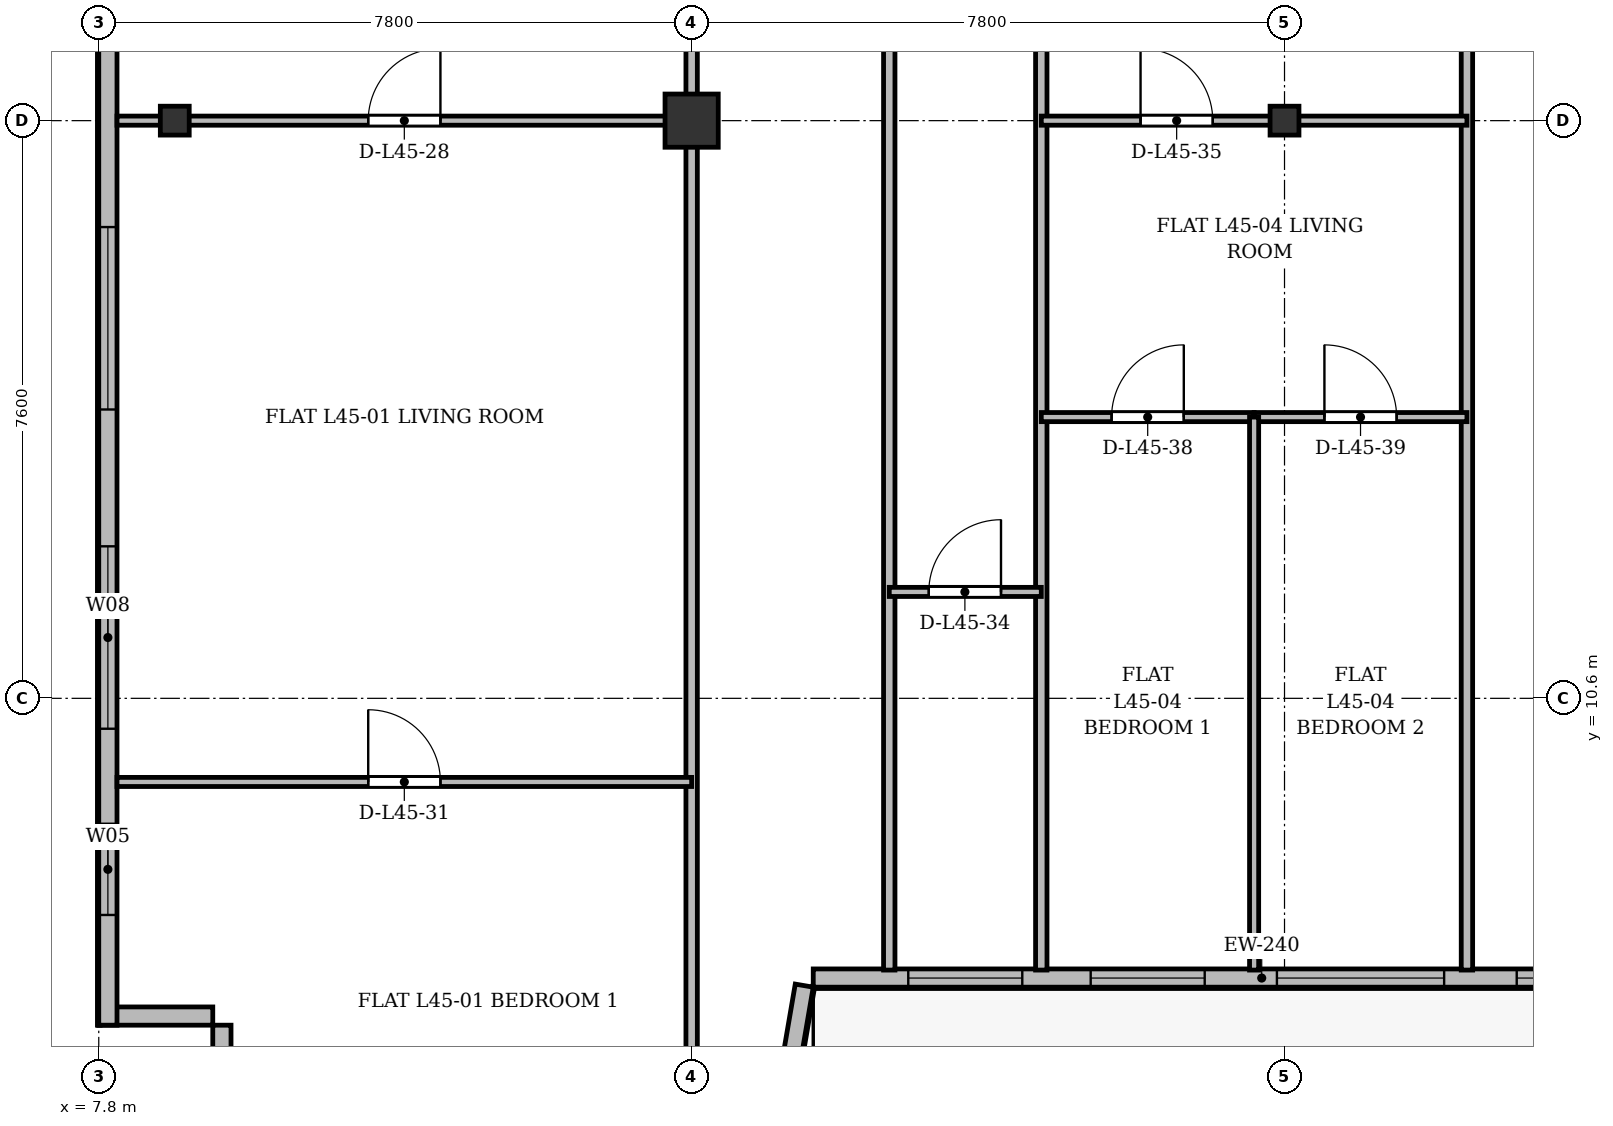
"""IFC4 building model, lengths in metres.
Left out: names, types, materials, properties, quantities, classifications, styles, units other than length and angle.
Written with IfcOpenShell. Run it as: python <this file> out.ifc"""

import sys

from ifc_helpers import new_model, si_unit, direction, frame, frame_2d, origin, origin_2d, place, context, subcontext, project, spatial, rectangle, i_section, extrude, source, transform, mapped, element, fill, save


model = new_model("IFC4")
c1 = context("Model", 3, precision=1e-05, world=origin(), true_north=direction((0.0, 1.0)))
c2 = subcontext(c1, "Body", "Model", "MODEL_VIEW")
j1 = project(units=[si_unit("LENGTHUNIT", "METRE"), si_unit("PLANEANGLEUNIT", "RADIAN")], contexts=[c1])
p1 = place(None, origin())
s1 = spatial("IfcSite", under=j1, at=p1, CompositionType="ELEMENT")
p2 = place(p1, origin())
s2 = spatial("IfcBuilding", under=s1, at=p2, CompositionType="ELEMENT")
p3 = place(p2, frame((0.0, 0.0, 171.7)))
s3 = spatial("IfcBuildingStorey", under=s2, at=p3, CompositionType="ELEMENT", Elevation=171.7)
m1 = source(origin(), c2, "Body", "SweptSolid", [
    extrude(i_section(OverallWidth=0.38, OverallDepth=0.38, WebThickness=0.02, FlangeThickness=0.03, at=origin_2d()), origin(), (0.0, 0.0, 1.0), 3.6),
])
p4 = place(p3, frame((8.8, 18.2, 0.0), z_axis=(0.0, 0.0, 1.0), x_axis=(1.0, 0.0, 0.0)))
e1 = element("IfcColumn", 1, at=p4, inside=s3, PredefinedType="COLUMN", context=c2, shape_type="MappedRepresentation", body=[
    mapped(m1, transform((0.0, 0.0, 0.0), x_axis=(1.0, 0.0, 0.0), y_axis=(0.0, 1.0, 0.0), z_axis=(0.0, 0.0, 1.0), scale=1.0)),
])
m2 = source(origin(), c2, "Body", "SweptSolid", [
    extrude(rectangle(XDim=0.7, YDim=0.7, at=origin_2d()), origin(), (0.0, 0.0, 1.0), 3.6),
])
p5 = place(p3, frame((15.6, 18.2, 0.0), z_axis=(0.0, 0.0, 1.0), x_axis=(1.0, 0.0, 0.0)))
e2 = element("IfcColumn", 2, at=p5, inside=s3, PredefinedType="COLUMN", context=c2, shape_type="MappedRepresentation", body=[
    mapped(m2, transform((0.0, 0.0, 0.0), x_axis=(1.0, 0.0, 0.0), y_axis=(0.0, 1.0, 0.0), z_axis=(0.0, 0.0, 1.0), scale=1.0)),
])
p6 = place(p3, frame((23.4, 18.2, 0.0), z_axis=(0.0, 0.0, 1.0), x_axis=(1.0, 0.0, 0.0)))
e3 = element("IfcColumn", 3, at=p6, inside=s3, PredefinedType="COLUMN", context=c2, shape_type="MappedRepresentation", body=[
    mapped(m1, transform((0.0, 0.0, 0.0), x_axis=(1.0, 0.0, 0.0), y_axis=(0.0, 1.0, 0.0), z_axis=(0.0, 0.0, 1.0), scale=1.0)),
])
p7 = place(p3, frame((9.42, 4.8, 0.0), z_axis=(0.0, 0.0, 1.0), x_axis=(0.0, 1.0, 0.0)))
e4 = element("IfcWall", 4, at=p7, inside=s3, PredefinedType="SOLIDWALL", context=c2, shape_type="SweptSolid", body=[
    extrude(rectangle(XDim=1.5, YDim=0.24, at=frame_2d((0.75, 0.0))), origin(), (0.0, 0.0, 1.0), 3.35),
])
p8 = place(p3, frame((9.3, 6.42, 0.0), z_axis=(0.0, 0.0, 1.0), x_axis=(-1.0, 0.0, 0.0)))
e5 = element("IfcWall", 5, at=p8, inside=s3, PredefinedType="SOLIDWALL", context=c2, shape_type="SweptSolid", body=[
    extrude(rectangle(XDim=1.5, YDim=0.24, at=frame_2d((0.75, 0.0))), origin(), (0.0, 0.0, 1.0), 2.85),
])
p9 = place(p3, frame((7.92, 6.3, 0.0), z_axis=(0.0, 0.0, 1.0), x_axis=(0.0, 1.0, 0.0)))
e6 = element("IfcWall", 6, at=p9, inside=s3, PredefinedType="SOLIDWALL", context=c2, shape_type="SweptSolid", body=[
    extrude(rectangle(XDim=39.2, YDim=0.24, at=frame_2d((19.6, 0.0))), origin(), (0.0, 0.0, 1.0), 3.35),
])
p10 = place(p9, frame((1.45, 0.0, 0.92)))
e7 = element("IfcOpeningElement", 7, at=p10, cuts=e6, PredefinedType="OPENING", context=c2, shape_type="SweptSolid", body=[
    extrude(rectangle(XDim=1.2, YDim=1.65, at=frame_2d((0.6, 0.825))), frame((0.0, 0.13, 0.0), z_axis=(0.0, -1.0, 0.0), x_axis=(1.0, 0.0, 0.0)), (0.0, 0.0, 1.0), 0.26),
])
p11 = place(p9, frame((3.9, 0.0, 0.92)))
e8 = element("IfcOpeningElement", 8, at=p11, cuts=e6, PredefinedType="OPENING", context=c2, shape_type="SweptSolid", body=[
    extrude(rectangle(XDim=2.4, YDim=2.1, at=frame_2d((1.2, 1.05))), frame((0.0, 0.13, 0.0), z_axis=(0.0, -1.0, 0.0), x_axis=(1.0, 0.0, 0.0)), (0.0, 0.0, 1.0), 0.26),
])
p12 = place(p9, frame((8.1, 0.0, 0.92)))
e9 = element("IfcOpeningElement", 9, at=p12, cuts=e6, PredefinedType="OPENING", context=c2, shape_type="SweptSolid", body=[
    extrude(rectangle(XDim=2.4, YDim=2.1, at=frame_2d((1.2, 1.05))), frame((0.0, 0.13, 0.0), z_axis=(0.0, -1.0, 0.0), x_axis=(1.0, 0.0, 0.0)), (0.0, 0.0, 1.0), 0.26),
])
p13 = place(p9, frame((15.3, 0.0, 0.92)))
e10 = element("IfcOpeningElement", 10, at=p13, cuts=e6, PredefinedType="OPENING", context=c2, shape_type="SweptSolid", body=[
    extrude(rectangle(XDim=2.4, YDim=2.1, at=frame_2d((1.2, 1.05))), frame((0.0, 0.13, 0.0), z_axis=(0.0, -1.0, 0.0), x_axis=(1.0, 0.0, 0.0)), (0.0, 0.0, 1.0), 0.26),
])
p14 = place(p9, frame((33.5, 0.0, 0.92)))
e11 = element("IfcOpeningElement", 11, at=p14, cuts=e6, PredefinedType="OPENING", context=c2, shape_type="SweptSolid", body=[
    extrude(rectangle(XDim=1.2, YDim=1.65, at=frame_2d((0.6, 0.825))), frame((0.0, 0.13, 0.0), z_axis=(0.0, -1.0, 0.0), x_axis=(1.0, 0.0, 0.0)), (0.0, 0.0, 1.0), 0.26),
])
p15 = place(p9, frame((36.85, 0.0, 0.92)))
e12 = element("IfcOpeningElement", 12, at=p15, cuts=e6, PredefinedType="OPENING", context=c2, shape_type="SweptSolid", body=[
    extrude(rectangle(XDim=1.2, YDim=1.65, at=frame_2d((0.6, 0.825))), frame((0.0, 0.13, 0.0), z_axis=(0.0, -1.0, 0.0), x_axis=(1.0, 0.0, 0.0)), (0.0, 0.0, 1.0), 0.26),
])
p16 = place(p3, frame((29.0, 6.92, 0.0), z_axis=(0.0, 0.0, 1.0), x_axis=(-1.0, 0.0, 0.0)))
e13 = element("IfcWall", 13, at=p16, inside=s3, PredefinedType="SOLIDWALL", context=c2, shape_type="SweptSolid", body=[
    extrude(rectangle(XDim=11.8, YDim=0.24, at=frame_2d((5.9, 0.0))), origin(), (0.0, 0.0, 1.0), 2.85),
])
p17 = place(p16, frame((0.745, 0.0, 0.9)))
e14 = element("IfcOpeningElement", 14, at=p17, cuts=e13, PredefinedType="OPENING", context=c2, shape_type="SweptSolid", body=[
    extrude(rectangle(XDim=1.8, YDim=1.8, at=frame_2d((0.9, 0.9))), frame((0.0, 0.13, 0.0), z_axis=(0.0, -1.0, 0.0), x_axis=(1.0, 0.0, 0.0)), (0.0, 0.0, 1.0), 0.26),
])
p18 = place(p16, frame((3.5, 0.0, 0.9)))
e15 = element("IfcOpeningElement", 15, at=p18, cuts=e13, PredefinedType="OPENING", context=c2, shape_type="SweptSolid", body=[
    extrude(rectangle(XDim=2.2, YDim=1.8, at=frame_2d((1.1, 0.9))), frame((0.0, 0.13, 0.0), z_axis=(0.0, -1.0, 0.0), x_axis=(1.0, 0.0, 0.0)), (0.0, 0.0, 1.0), 0.26),
])
p19 = place(p16, frame((6.65, 0.0, 0.9)))
e16 = element("IfcOpeningElement", 16, at=p19, cuts=e13, PredefinedType="OPENING", context=c2, shape_type="SweptSolid", body=[
    extrude(rectangle(XDim=1.5, YDim=1.75, at=frame_2d((0.75, 0.875))), frame((0.0, 0.13, 0.0), z_axis=(0.0, -1.0, 0.0), x_axis=(1.0, 0.0, 0.0)), (0.0, 0.0, 1.0), 0.26),
])
p20 = place(p16, frame((9.05, 0.0, 0.9)))
e17 = element("IfcOpeningElement", 17, at=p20, cuts=e13, PredefinedType="OPENING", context=c2, shape_type="SweptSolid", body=[
    extrude(rectangle(XDim=1.5, YDim=1.75, at=frame_2d((0.75, 0.875))), frame((0.0, 0.13, 0.0), z_axis=(0.0, -1.0, 0.0), x_axis=(1.0, 0.0, 0.0)), (0.0, 0.0, 1.0), 0.26),
])
p21 = place(p3, frame((17.082, 6.82, 0.0), z_axis=(0.0, 0.0, 1.0), x_axis=(-0.168990530437, -0.98561767467, 0.0)))
e18 = element("IfcWall", 18, at=p21, inside=s3, PredefinedType="SOLIDWALL", context=c2, shape_type="SweptSolid", body=[
    extrude(rectangle(XDim=3.551, YDim=0.24, at=frame_2d((1.775, 0.0))), origin(), (0.0, 0.0, 1.0), 2.75),
])
p22 = place(p3, frame((15.6, 3.525, 0.0), z_axis=(0.0, 0.0, 1.0), x_axis=(0.0, 1.0, 0.0)))
e19 = element("IfcWall", 19, at=p22, inside=s3, PredefinedType="PARTITIONING", context=c2, shape_type="SweptSolid", body=[
    extrude(rectangle(XDim=27.275, YDim=0.15, at=frame_2d((13.638, 0.0))), origin(), (0.0, 0.0, 1.0), 2.85),
])
p23 = place(p3, frame((25.8, 7.025, 0.0), z_axis=(0.0, 0.0, 1.0), x_axis=(0.0, 1.0, 0.0)))
e20 = element("IfcWall", 20, at=p23, inside=s3, PredefinedType="PARTITIONING", context=c2, shape_type="SweptSolid", body=[
    extrude(rectangle(XDim=23.775, YDim=0.15, at=frame_2d((11.888, 0.0))), origin(), (0.0, 0.0, 1.0), 2.75),
])
p24 = place(p3, frame((8.04, 18.2, 0.0), z_axis=(0.0, 0.0, 1.0), x_axis=(1.0, 0.0, 0.0)))
e21 = element("IfcWall", 21, at=p24, inside=s3, PredefinedType="PARTITIONING", context=c2, shape_type="SweptSolid", body=[
    extrude(rectangle(XDim=7.56, YDim=0.12, at=frame_2d((3.78, 0.0))), origin(), (0.0, 0.0, 1.0), 2.75),
])
p25 = place(p24, frame((3.305, 0.0, 0.0)))
e22 = element("IfcOpeningElement", 22, at=p25, cuts=e21, PredefinedType="OPENING", context=c2, shape_type="SweptSolid", body=[
    extrude(rectangle(XDim=0.95, YDim=2.15, at=frame_2d((0.475, 1.075))), frame((0.0, 0.07, 0.0), z_axis=(0.0, -1.0, 0.0), x_axis=(1.0, 0.0, 0.0)), (0.0, 0.0, 1.0), 0.14),
])
p26 = place(p3, frame((8.04, 9.5, 0.0), z_axis=(0.0, 0.0, 1.0), x_axis=(1.0, 0.0, 0.0)))
e23 = element("IfcWall", 23, at=p26, inside=s3, PredefinedType="PARTITIONING", context=c2, shape_type="SweptSolid", body=[
    extrude(rectangle(XDim=7.56, YDim=0.12, at=frame_2d((3.78, 0.0))), origin(), (0.0, 0.0, 1.0), 2.85),
])
p27 = place(p26, frame((3.305, 0.0, 0.0)))
e24 = element("IfcOpeningElement", 24, at=p27, cuts=e23, PredefinedType="OPENING", context=c2, shape_type="SweptSolid", body=[
    extrude(rectangle(XDim=0.95, YDim=2.15, at=frame_2d((0.475, 1.075))), frame((0.0, 0.07, 0.0), z_axis=(0.0, -1.0, 0.0), x_axis=(1.0, 0.0, 0.0)), (0.0, 0.0, 1.0), 0.14),
])
for number, where, z_axis, x_axis in (
    (25, (18.2, 7.025, 0.0), (0.0, 0.0, 1.0), (0.0, 1.0, 0.0)),
    (26, (20.2, 7.025, 0.0), (0.0, 0.0, 1.0), (0.0, 1.0, 0.0)),
):
    element("IfcWall", number, at=place(p3, frame(where, z_axis=z_axis, x_axis=x_axis)), inside=s3, PredefinedType="PARTITIONING", context=c2, shape_type="SweptSolid", body=[
        extrude(rectangle(XDim=23.775, YDim=0.15, at=frame_2d((11.888, 0.0))), origin(), (0.0, 0.0, 1.0), 2.75),
    ])
p28 = place(p3, frame((18.2, 12.0, 0.0), z_axis=(0.0, 0.0, 1.0), x_axis=(1.0, 0.0, 0.0)))
e27 = element("IfcWall", 27, at=p28, inside=s3, PredefinedType="PARTITIONING", context=c2, shape_type="SweptSolid", body=[
    extrude(rectangle(XDim=2.0, YDim=0.12, at=frame_2d((1.0, 0.0))), origin(), (0.0, 0.0, 1.0), 3.35),
])
p29 = place(p28, frame((0.52, 0.0, 0.0)))
e28 = element("IfcOpeningElement", 28, at=p29, cuts=e27, PredefinedType="OPENING", context=c2, shape_type="SweptSolid", body=[
    extrude(rectangle(XDim=0.95, YDim=2.15, at=frame_2d((0.475, 1.075))), frame((0.0, 0.07, 0.0), z_axis=(0.0, -1.0, 0.0), x_axis=(1.0, 0.0, 0.0)), (0.0, 0.0, 1.0), 0.14),
])
p30 = place(p3, frame((20.2, 18.2, 0.0), z_axis=(0.0, 0.0, 1.0), x_axis=(1.0, 0.0, 0.0)))
e29 = element("IfcWall", 29, at=p30, inside=s3, PredefinedType="PARTITIONING", context=c2, shape_type="SweptSolid", body=[
    extrude(rectangle(XDim=5.6, YDim=0.12, at=frame_2d((2.8, 0.0))), origin(), (0.0, 0.0, 1.0), 2.75),
])
p31 = place(p30, frame((1.306, 0.0, 0.0)))
e30 = element("IfcOpeningElement", 30, at=p31, cuts=e29, PredefinedType="OPENING", context=c2, shape_type="SweptSolid", body=[
    extrude(rectangle(XDim=0.95, YDim=2.15, at=frame_2d((0.475, 1.075))), frame((0.0, 0.07, 0.0), z_axis=(0.0, -1.0, 0.0), x_axis=(1.0, 0.0, 0.0)), (0.0, 0.0, 1.0), 0.14),
])
p32 = place(p3, frame((20.2, 14.3, 0.0), z_axis=(0.0, 0.0, 1.0), x_axis=(1.0, 0.0, 0.0)))
e31 = element("IfcWall", 31, at=p32, inside=s3, PredefinedType="PARTITIONING", context=c2, shape_type="SweptSolid", body=[
    extrude(rectangle(XDim=2.8, YDim=0.12, at=frame_2d((1.4, 0.0))), origin(), (0.0, 0.0, 1.0), 3.35),
])
p33 = place(p32, frame((0.925, 0.0, 0.0)))
e32 = element("IfcOpeningElement", 32, at=p33, cuts=e31, PredefinedType="OPENING", context=c2, shape_type="SweptSolid", body=[
    extrude(rectangle(XDim=0.95, YDim=2.15, at=frame_2d((0.475, 1.075))), frame((0.0, 0.07, 0.0), z_axis=(0.0, -1.0, 0.0), x_axis=(1.0, 0.0, 0.0)), (0.0, 0.0, 1.0), 0.14),
])
p34 = place(p3, frame((23.0, 14.3, 0.0), z_axis=(0.0, 0.0, 1.0), x_axis=(1.0, 0.0, 0.0)))
e33 = element("IfcWall", 33, at=p34, inside=s3, PredefinedType="PARTITIONING", context=c2, shape_type="SweptSolid", body=[
    extrude(rectangle(XDim=2.8, YDim=0.12, at=frame_2d((1.4, 0.0))), origin(), (0.0, 0.0, 1.0), 2.85),
])
p35 = place(p34, frame((0.925, 0.0, 0.0)))
e34 = element("IfcOpeningElement", 34, at=p35, cuts=e33, PredefinedType="OPENING", context=c2, shape_type="SweptSolid", body=[
    extrude(rectangle(XDim=0.95, YDim=2.15, at=frame_2d((0.475, 1.075))), frame((0.0, 0.07, 0.0), z_axis=(0.0, -1.0, 0.0), x_axis=(1.0, 0.0, 0.0)), (0.0, 0.0, 1.0), 0.14),
])
p36 = place(p3, frame((23.0, 7.025, 0.0), z_axis=(0.0, 0.0, 1.0), x_axis=(0.0, 1.0, 0.0)))
e35 = element("IfcWall", 35, at=p36, inside=s3, PredefinedType="PARTITIONING", context=c2, shape_type="SweptSolid", body=[
    extrude(rectangle(XDim=7.275, YDim=0.12, at=frame_2d((3.638, 0.0))), origin(), (0.0, 0.0, 1.0), 3.35),
])
m3 = source(origin(), c2, "Body", "SweptSolid", [
    extrude(rectangle(XDim=1.2, YDim=1.65, at=frame_2d((0.6, 0.825))), frame((0.0, 0.03, 0.0), z_axis=(0.0, -1.0, 0.0), x_axis=(1.0, 0.0, 0.0)), (0.0, 0.0, 1.0), 0.06),
])
p37 = place(p10, origin())
e36 = element("IfcWindow", 36, at=p37, inside=s3, PartitioningType="SINGLE_PANEL", PredefinedType="WINDOW", context=c2, shape_type="MappedRepresentation", body=[
    mapped(m3, transform((0.0, 0.0, 0.0), x_axis=(1.0, 0.0, 0.0), y_axis=(0.0, 1.0, 0.0), z_axis=(0.0, 0.0, 1.0), scale=1.0)),
])
fill(e7, e36)
m4 = source(origin(), c2, "Body", "SweptSolid", [
    extrude(rectangle(XDim=2.4, YDim=2.1, at=frame_2d((1.2, 1.05))), frame((0.0, 0.03, 0.0), z_axis=(0.0, -1.0, 0.0), x_axis=(1.0, 0.0, 0.0)), (0.0, 0.0, 1.0), 0.06),
])
p38 = place(p11, origin())
e37 = element("IfcWindow", 37, at=p38, inside=s3, PartitioningType="SINGLE_PANEL", PredefinedType="WINDOW", context=c2, shape_type="MappedRepresentation", body=[
    mapped(m4, transform((0.0, 0.0, 0.0), x_axis=(1.0, 0.0, 0.0), y_axis=(0.0, 1.0, 0.0), z_axis=(0.0, 0.0, 1.0), scale=1.0)),
])
fill(e8, e37)
p39 = place(p12, origin())
e38 = element("IfcWindow", 38, at=p39, inside=s3, PartitioningType="SINGLE_PANEL", PredefinedType="WINDOW", context=c2, shape_type="MappedRepresentation", body=[
    mapped(m4, transform((0.0, 0.0, 0.0), x_axis=(1.0, 0.0, 0.0), y_axis=(0.0, 1.0, 0.0), z_axis=(0.0, 0.0, 1.0), scale=1.0)),
])
fill(e9, e38)
m5 = source(origin(), c2, "Body", "SweptSolid", [
    extrude(rectangle(XDim=1.8, YDim=1.8, at=frame_2d((0.9, 0.9))), frame((0.0, 0.03, 0.0), z_axis=(0.0, -1.0, 0.0), x_axis=(1.0, 0.0, 0.0)), (0.0, 0.0, 1.0), 0.06),
])
p40 = place(p17, origin())
e39 = element("IfcWindow", 39, at=p40, inside=s3, PartitioningType="SINGLE_PANEL", PredefinedType="WINDOW", context=c2, shape_type="MappedRepresentation", body=[
    mapped(m5, transform((0.0, 0.0, 0.0), x_axis=(1.0, 0.0, 0.0), y_axis=(0.0, 1.0, 0.0), z_axis=(0.0, 0.0, 1.0), scale=1.0)),
])
fill(e14, e39)
m6 = source(origin(), c2, "Body", "SweptSolid", [
    extrude(rectangle(XDim=2.2, YDim=1.8, at=frame_2d((1.1, 0.9))), frame((0.0, 0.03, 0.0), z_axis=(0.0, -1.0, 0.0), x_axis=(1.0, 0.0, 0.0)), (0.0, 0.0, 1.0), 0.06),
])
p41 = place(p18, origin())
e40 = element("IfcWindow", 40, at=p41, inside=s3, PartitioningType="SINGLE_PANEL", PredefinedType="WINDOW", context=c2, shape_type="MappedRepresentation", body=[
    mapped(m6, transform((0.0, 0.0, 0.0), x_axis=(1.0, 0.0, 0.0), y_axis=(0.0, 1.0, 0.0), z_axis=(0.0, 0.0, 1.0), scale=1.0)),
])
fill(e15, e40)
m7 = source(origin(), c2, "Body", "SweptSolid", [
    extrude(rectangle(XDim=1.5, YDim=1.75, at=frame_2d((0.75, 0.875))), frame((0.0, 0.03, 0.0), z_axis=(0.0, -1.0, 0.0), x_axis=(1.0, 0.0, 0.0)), (0.0, 0.0, 1.0), 0.06),
])
p42 = place(p19, origin())
e41 = element("IfcWindow", 41, at=p42, inside=s3, PartitioningType="SINGLE_PANEL", PredefinedType="WINDOW", context=c2, shape_type="MappedRepresentation", body=[
    mapped(m7, transform((0.0, 0.0, 0.0), x_axis=(1.0, 0.0, 0.0), y_axis=(0.0, 1.0, 0.0), z_axis=(0.0, 0.0, 1.0), scale=1.0)),
])
fill(e16, e41)
p43 = place(p20, origin())
e42 = element("IfcWindow", 42, at=p43, inside=s3, PartitioningType="SINGLE_PANEL", PredefinedType="WINDOW", context=c2, shape_type="MappedRepresentation", body=[
    mapped(m7, transform((0.0, 0.0, 0.0), x_axis=(1.0, 0.0, 0.0), y_axis=(0.0, 1.0, 0.0), z_axis=(0.0, 0.0, 1.0), scale=1.0)),
])
fill(e17, e42)
m8 = source(origin(), c2, "Body", "SweptSolid", [
    extrude(rectangle(XDim=0.95, YDim=2.15, at=frame_2d((0.475, 1.075))), frame((0.0, 0.025, 0.0), z_axis=(0.0, -1.0, 0.0), x_axis=(1.0, 0.0, 0.0)), (0.0, 0.0, 1.0), 0.05),
])
p44 = place(p25, origin())
e43 = element("IfcDoor", 43, at=p44, inside=s3, OperationType="SINGLE_SWING_RIGHT", PredefinedType="DOOR", context=c2, shape_type="MappedRepresentation", body=[
    mapped(m8, transform((0.0, 0.0, 0.0), x_axis=(1.0, 0.0, 0.0), y_axis=(0.0, 1.0, 0.0), z_axis=(0.0, 0.0, 1.0), scale=1.0)),
])
fill(e22, e43)
p45 = place(p27, origin())
e44 = element("IfcDoor", 44, at=p45, inside=s3, OperationType="SINGLE_SWING_LEFT", PredefinedType="DOOR", context=c2, shape_type="MappedRepresentation", body=[
    mapped(m8, transform((0.0, 0.0, 0.0), x_axis=(1.0, 0.0, 0.0), y_axis=(0.0, 1.0, 0.0), z_axis=(0.0, 0.0, 1.0), scale=1.0)),
])
fill(e24, e44)
p46 = place(p29, origin())
e45 = element("IfcDoor", 45, at=p46, inside=s3, OperationType="SINGLE_SWING_RIGHT", PredefinedType="DOOR", context=c2, shape_type="MappedRepresentation", body=[
    mapped(m8, transform((0.0, 0.0, 0.0), x_axis=(1.0, 0.0, 0.0), y_axis=(0.0, 1.0, 0.0), z_axis=(0.0, 0.0, 1.0), scale=1.0)),
])
fill(e28, e45)
p47 = place(p31, origin())
e46 = element("IfcDoor", 46, at=p47, inside=s3, OperationType="SINGLE_SWING_LEFT", PredefinedType="DOOR", context=c2, shape_type="MappedRepresentation", body=[
    mapped(m8, transform((0.0, 0.0, 0.0), x_axis=(1.0, 0.0, 0.0), y_axis=(0.0, 1.0, 0.0), z_axis=(0.0, 0.0, 1.0), scale=1.0)),
])
fill(e30, e46)
p48 = place(p33, origin())
e47 = element("IfcDoor", 47, at=p48, inside=s3, OperationType="SINGLE_SWING_RIGHT", PredefinedType="DOOR", context=c2, shape_type="MappedRepresentation", body=[
    mapped(m8, transform((0.0, 0.0, 0.0), x_axis=(1.0, 0.0, 0.0), y_axis=(0.0, 1.0, 0.0), z_axis=(0.0, 0.0, 1.0), scale=1.0)),
])
fill(e32, e47)
p49 = place(p35, origin())
e48 = element("IfcDoor", 48, at=p49, inside=s3, OperationType="SINGLE_SWING_LEFT", PredefinedType="DOOR", context=c2, shape_type="MappedRepresentation", body=[
    mapped(m8, transform((0.0, 0.0, 0.0), x_axis=(1.0, 0.0, 0.0), y_axis=(0.0, 1.0, 0.0), z_axis=(0.0, 0.0, 1.0), scale=1.0)),
])
fill(e34, e48)
save(model, sys.argv[1])
